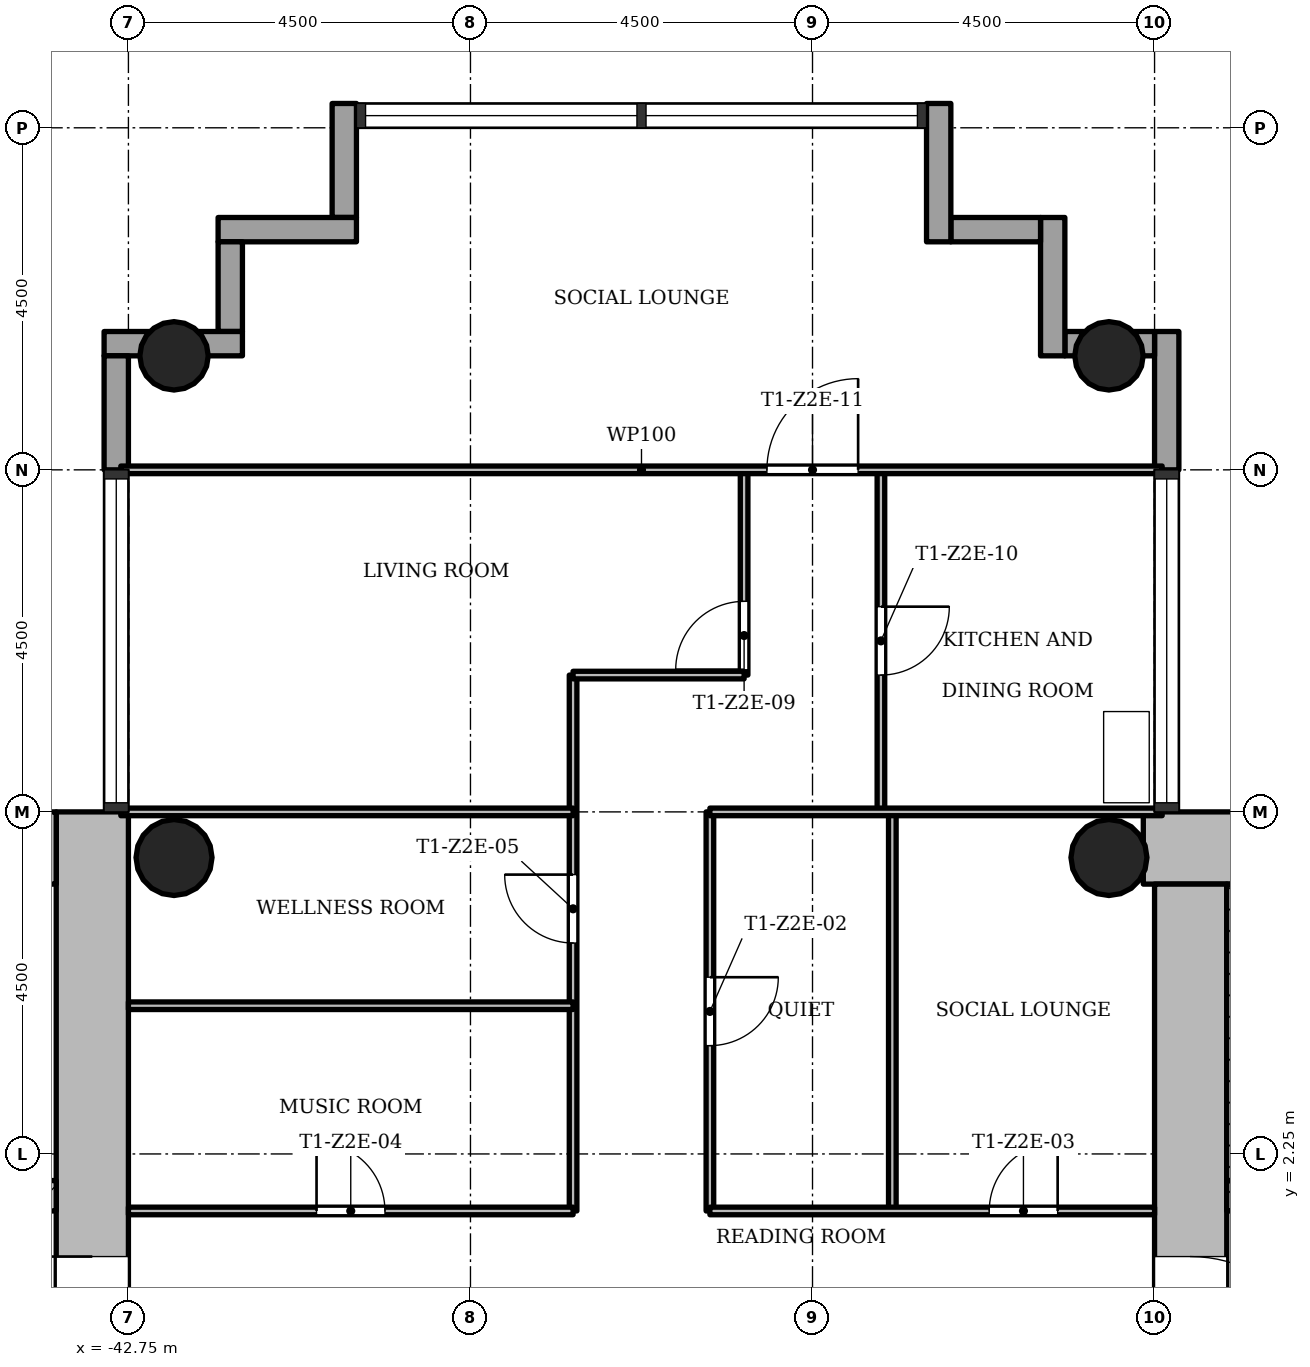
"""IFC4 building model, lengths in metres.
Left out: names, types, materials, properties, quantities, classifications, styles, units other than length and angle.
Written with IfcOpenShell. Run it as: python <this file> out.ifc"""

import sys

from ifc_helpers import new_model, si_unit, direction, frame, frame_2d, origin, origin_2d, place, context, subcontext, project, spatial, rectangle, hollow_circle, extrude, element, fill, save


model = new_model("IFC4")
c1 = context("Model", 3, precision=1e-05, world=origin(), true_north=direction((0.0, 1.0)))
c2 = subcontext(c1, "Body", "Model", "MODEL_VIEW")
j1 = project(units=[si_unit("LENGTHUNIT", "METRE"), si_unit("PLANEANGLEUNIT", "RADIAN")], contexts=[c1])
p1 = place(None, origin())
s1 = spatial("IfcSite", under=j1, at=p1, CompositionType="ELEMENT")
p2 = place(p1, origin())
s2 = spatial("IfcBuilding", under=s1, at=p2, CompositionType="ELEMENT")
p3 = place(p2, frame((0.0, 0.0, 103.8)))
s3 = spatial("IfcBuildingStorey", under=s2, at=p3, CompositionType="ELEMENT", Elevation=103.8)
p4 = place(p3, frame((-20.702, 6.275, 0.0), z_axis=(0.0, 0.0, 1.0), x_axis=(-1.0, 0.0, 0.0)))
e1 = element("IfcWall", 1, at=p4, inside=s3, PredefinedType="SHEAR", context=c2, shape_type="SweptSolid", body=[
    extrude(rectangle(XDim=8.696, YDim=0.95, at=frame_2d((4.348, 0.0))), origin(), (0.0, 0.0, 1.0), 3.4),
])
p5 = place(p3, frame((-28.775, 5.8, 0.0), z_axis=(0.0, 0.0, 1.0), x_axis=(0.0, -1.0, 0.0)))
e2 = element("IfcWall", 2, at=p5, inside=s3, PredefinedType="SHEAR", context=c2, shape_type="SweptSolid", body=[
    extrude(rectangle(XDim=12.55, YDim=0.95, at=frame_2d((6.275, 0.0))), origin(), (0.0, 0.0, 1.0), 3.4),
])
p6 = place(p5, frame((4.9, 0.0, 0.0)))
e3 = element("IfcOpeningElement", 3, at=p6, cuts=e2, PredefinedType="OPENING", context=c2, shape_type="SweptSolid", body=[
    extrude(rectangle(XDim=1.8, YDim=2.1, at=frame_2d((0.9, 1.05))), frame((0.0, 0.485, 0.0), z_axis=(0.0, -1.0, 0.0), x_axis=(1.0, 0.0, 0.0)), (0.0, 0.0, 1.0), 0.97),
])
p7 = place(p3, frame((-28.3, 1.7, 0.0), z_axis=(0.0, 0.0, 1.0), x_axis=(1.0, 0.0, 0.0)))
e4 = element("IfcWall", 4, at=p7, inside=s3, PredefinedType="SHEAR", context=c2, shape_type="SweptSolid", body=[
    extrude(rectangle(XDim=7.1, YDim=0.4, at=frame_2d((3.55, 0.0))), origin(), (0.0, 0.0, 1.0), 3.4),
])
p8 = place(p7, frame((0.7, 0.0, 0.0)))
e5 = element("IfcOpeningElement", 5, at=p8, cuts=e4, PredefinedType="OPENING", context=c2, shape_type="SweptSolid", body=[
    extrude(rectangle(XDim=0.9, YDim=2.1, at=frame_2d((0.45, 1.05))), frame((0.0, 0.21, 0.0), z_axis=(0.0, -1.0, 0.0), x_axis=(1.0, 0.0, 0.0)), (0.0, 0.0, 1.0), 0.42),
])
p9 = place(p3, frame((-43.225, -5.8, 0.0), z_axis=(0.0, 0.0, 1.0), x_axis=(0.0, 1.0, 0.0)))
e6 = element("IfcWall", 6, at=p9, inside=s3, PredefinedType="SHEAR", context=c2, shape_type="SweptSolid", body=[
    extrude(rectangle(XDim=12.55, YDim=0.95, at=frame_2d((6.275, 0.0))), origin(), (0.0, 0.0, 1.0), 3.4),
])
p10 = place(p9, frame((4.9, 0.0, 0.0)))
e7 = element("IfcOpeningElement", 7, at=p10, cuts=e6, PredefinedType="OPENING", context=c2, shape_type="SweptSolid", body=[
    extrude(rectangle(XDim=1.8, YDim=2.1, at=frame_2d((0.9, 1.05))), frame((0.0, 0.485, 0.0), z_axis=(0.0, -1.0, 0.0), x_axis=(1.0, 0.0, 0.0)), (0.0, 0.0, 1.0), 0.97),
])
p11 = place(p3, frame((-43.7, 6.275, 0.0), z_axis=(0.0, 0.0, 1.0), x_axis=(-1.0, 0.0, 0.0)))
e8 = element("IfcWall", 8, at=p11, inside=s3, PredefinedType="SHEAR", context=c2, shape_type="SweptSolid", body=[
    extrude(rectangle(XDim=8.05, YDim=0.95, at=frame_2d((4.025, 0.0))), origin(), (0.0, 0.0, 1.0), 3.4),
])
p12 = place(p3, frame((-50.8, 1.7, 0.0), z_axis=(0.0, 0.0, 1.0), x_axis=(1.0, 0.0, 0.0)))
e9 = element("IfcWall", 9, at=p12, inside=s3, PredefinedType="SHEAR", context=c2, shape_type="SweptSolid", body=[
    extrude(rectangle(XDim=7.1, YDim=0.4, at=frame_2d((3.55, 0.0))), origin(), (0.0, 0.0, 1.0), 3.4),
])
p13 = place(p12, frame((5.2, 0.0, 0.0)))
e10 = element("IfcOpeningElement", 10, at=p13, cuts=e9, PredefinedType="OPENING", context=c2, shape_type="SweptSolid", body=[
    extrude(rectangle(XDim=1.1, YDim=2.1, at=frame_2d((0.55, 1.05))), frame((0.0, 0.21, 0.0), z_axis=(0.0, -1.0, 0.0), x_axis=(1.0, 0.0, 0.0)), (0.0, 0.0, 1.0), 0.42),
])
for number, where, z_axis, x_axis in (
    (11, (-29.85, 12.75, 0.0), (0.0, 0.0, 1.0), (1.0, 0.0, 0.0)),
    (12, (-42.15, 12.75, 0.0), (0.0, 0.0, 1.0), (1.0, 0.0, 0.0)),
):
    element("IfcColumn", number, at=place(p3, frame(where, z_axis=z_axis, x_axis=x_axis)), inside=s3, PredefinedType="COLUMN", context=c2, shape_type="SweptSolid", body=[
        extrude(hollow_circle(Radius=0.45, WallThickness=0.032, at=origin_2d()), origin(), (0.0, 0.0, 1.0), 3.4),
    ])
for number, where, z_axis, x_axis in (
    (13, (-29.85, 6.15, 0.0), (0.0, 0.0, 1.0), (1.0, 0.0, 0.0)),
    (14, (-42.15, 6.15, 0.0), (0.0, 0.0, 1.0), (1.0, 0.0, 0.0)),
):
    element("IfcColumn", number, at=place(p3, frame(where, z_axis=z_axis, x_axis=x_axis)), inside=s3, PredefinedType="COLUMN", context=c2, shape_type="SweptSolid", body=[
        extrude(hollow_circle(Radius=0.5, WallThickness=0.036, at=origin_2d()), origin(), (0.0, 0.0, 1.0), 3.4),
    ])
p14 = place(p3, frame((-29.09, 11.25, -0.3), z_axis=(0.0, 0.0, 1.0), x_axis=(0.0, 1.0, 0.0)))
e15 = element("IfcWall", 15, at=p14, inside=s3, PredefinedType="STANDARD", context=c2, shape_type="SweptSolid", body=[
    extrude(rectangle(XDim=1.82, YDim=0.32, at=frame_2d((0.91, 0.0))), origin(), (0.0, 0.0, 1.0), 3.4),
])
p15 = place(p3, frame((-29.25, 12.91, -0.3), z_axis=(0.0, 0.0, 1.0), x_axis=(-1.0, 0.0, 0.0)))
e16 = element("IfcWall", 16, at=p15, inside=s3, PredefinedType="STANDARD", context=c2, shape_type="SweptSolid", body=[
    extrude(rectangle(XDim=1.18, YDim=0.32, at=frame_2d((0.59, 0.0))), origin(), (0.0, 0.0, 1.0), 3.4),
])
p16 = place(p3, frame((-30.59, 12.75, -0.3), z_axis=(0.0, 0.0, 1.0), x_axis=(0.0, 1.0, 0.0)))
e17 = element("IfcWall", 17, at=p16, inside=s3, PredefinedType="STANDARD", context=c2, shape_type="SweptSolid", body=[
    extrude(rectangle(XDim=1.82, YDim=0.32, at=frame_2d((0.91, 0.0))), origin(), (0.0, 0.0, 1.0), 3.4),
])
p17 = place(p3, frame((-30.75, 14.41, -0.3), z_axis=(0.0, 0.0, 1.0), x_axis=(-1.0, 0.0, 0.0)))
e18 = element("IfcWall", 18, at=p17, inside=s3, PredefinedType="STANDARD", context=c2, shape_type="SweptSolid", body=[
    extrude(rectangle(XDim=1.18, YDim=0.32, at=frame_2d((0.59, 0.0))), origin(), (0.0, 0.0, 1.0), 3.4),
])
p18 = place(p3, frame((-32.09, 14.25, -0.3), z_axis=(0.0, 0.0, 1.0), x_axis=(0.0, 1.0, 0.0)))
e19 = element("IfcWall", 19, at=p18, inside=s3, PredefinedType="STANDARD", context=c2, shape_type="SweptSolid", body=[
    extrude(rectangle(XDim=1.82, YDim=0.32, at=frame_2d((0.91, 0.0))), origin(), (0.0, 0.0, 1.0), 3.4),
])
p19 = place(p3, frame((-39.91, 16.07, -0.3), z_axis=(0.0, 0.0, 1.0), x_axis=(0.0, -1.0, 0.0)))
e20 = element("IfcWall", 20, at=p19, inside=s3, PredefinedType="STANDARD", context=c2, shape_type="SweptSolid", body=[
    extrude(rectangle(XDim=1.5, YDim=0.32, at=frame_2d((0.75, 0.0))), origin(), (0.0, 0.0, 1.0), 3.4),
])
p20 = place(p3, frame((-39.75, 14.41, -0.3), z_axis=(0.0, 0.0, 1.0), x_axis=(-1.0, 0.0, 0.0)))
e21 = element("IfcWall", 21, at=p20, inside=s3, PredefinedType="STANDARD", context=c2, shape_type="SweptSolid", body=[
    extrude(rectangle(XDim=1.82, YDim=0.32, at=frame_2d((0.91, 0.0))), origin(), (0.0, 0.0, 1.0), 3.4),
])
p21 = place(p3, frame((-41.41, 14.25, -0.3), z_axis=(0.0, 0.0, 1.0), x_axis=(0.0, -1.0, 0.0)))
e22 = element("IfcWall", 22, at=p21, inside=s3, PredefinedType="STANDARD", context=c2, shape_type="SweptSolid", body=[
    extrude(rectangle(XDim=1.18, YDim=0.32, at=frame_2d((0.59, 0.0))), origin(), (0.0, 0.0, 1.0), 3.4),
])
p22 = place(p3, frame((-41.25, 12.91, -0.3), z_axis=(0.0, 0.0, 1.0), x_axis=(-1.0, 0.0, 0.0)))
e23 = element("IfcWall", 23, at=p22, inside=s3, PredefinedType="STANDARD", context=c2, shape_type="SweptSolid", body=[
    extrude(rectangle(XDim=1.82, YDim=0.32, at=frame_2d((0.91, 0.0))), origin(), (0.0, 0.0, 1.0), 3.4),
])
p23 = place(p3, frame((-42.91, 12.75, -0.3), z_axis=(0.0, 0.0, 1.0), x_axis=(0.0, -1.0, 0.0)))
e24 = element("IfcWall", 24, at=p23, inside=s3, PredefinedType="STANDARD", context=c2, shape_type="SweptSolid", body=[
    extrude(rectangle(XDim=1.5, YDim=0.32, at=frame_2d((0.75, 0.0))), origin(), (0.0, 0.0, 1.0), 3.4),
])
p24 = place(p3, frame((-36.9, 1.5, 0.0), z_axis=(0.0, 0.0, 1.0), x_axis=(0.0, 1.0, 0.0)))
e25 = element("IfcWall", 25, at=p24, inside=s3, PredefinedType="PARTITIONING", context=c2, shape_type="SweptSolid", body=[
    extrude(rectangle(XDim=7.05, YDim=0.1, at=frame_2d((3.525, 0.0))), origin(), (0.0, 0.0, 1.0), 3.0),
])
p25 = place(p24, frame((3.525, 0.0, 0.0)))
e26 = element("IfcOpeningElement", 26, at=p25, cuts=e25, PredefinedType="OPENING", context=c2, shape_type="SweptSolid", body=[
    extrude(rectangle(XDim=0.9, YDim=2.1, at=frame_2d((0.45, 1.05))), frame((0.0, 0.06, 0.0), z_axis=(0.0, -1.0, 0.0), x_axis=(1.0, 0.0, 0.0)), (0.0, 0.0, 1.0), 0.12),
])
p26 = place(p3, frame((-35.1, 1.5, 0.0), z_axis=(0.0, 0.0, 1.0), x_axis=(0.0, 1.0, 0.0)))
e27 = element("IfcWall", 27, at=p26, inside=s3, PredefinedType="PARTITIONING", context=c2, shape_type="SweptSolid", body=[
    extrude(rectangle(XDim=5.25, YDim=0.1, at=frame_2d((2.625, 0.0))), origin(), (0.0, 0.0, 1.0), 3.0),
])
p27 = place(p26, frame((2.175, 0.0, 0.0)))
e28 = element("IfcOpeningElement", 28, at=p27, cuts=e27, PredefinedType="OPENING", context=c2, shape_type="SweptSolid", body=[
    extrude(rectangle(XDim=0.9, YDim=2.1, at=frame_2d((0.45, 1.05))), frame((0.0, 0.06, 0.0), z_axis=(0.0, -1.0, 0.0), x_axis=(1.0, 0.0, 0.0)), (0.0, 0.0, 1.0), 0.12),
])
p28 = place(p3, frame((-34.65, 8.55, 0.0), z_axis=(0.0, 0.0, 1.0), x_axis=(0.0, 1.0, 0.0)))
e29 = element("IfcWall", 29, at=p28, inside=s3, PredefinedType="PARTITIONING", context=c2, shape_type="SweptSolid", body=[
    extrude(rectangle(XDim=2.7, YDim=0.1, at=frame_2d((1.35, 0.0))), origin(), (0.0, 0.0, 1.0), 3.0),
])
p29 = place(p28, frame((0.07, 0.0, 0.0)))
e30 = element("IfcOpeningElement", 30, at=p29, cuts=e29, PredefinedType="OPENING", context=c2, shape_type="SweptSolid", body=[
    extrude(rectangle(XDim=0.9, YDim=2.1, at=frame_2d((0.45, 1.05))), frame((0.0, 0.06, 0.0), z_axis=(0.0, -1.0, 0.0), x_axis=(1.0, 0.0, 0.0)), (0.0, 0.0, 1.0), 0.12),
])
p30 = place(p3, frame((-32.85, 6.75, 0.0), z_axis=(0.0, 0.0, 1.0), x_axis=(0.0, 1.0, 0.0)))
e31 = element("IfcWall", 31, at=p30, inside=s3, PredefinedType="PARTITIONING", context=c2, shape_type="SweptSolid", body=[
    extrude(rectangle(XDim=4.5, YDim=0.1, at=frame_2d((2.25, 0.0))), origin(), (0.0, 0.0, 1.0), 3.0),
])
p31 = place(p30, frame((1.8, 0.0, 0.0)))
e32 = element("IfcOpeningElement", 32, at=p31, cuts=e31, PredefinedType="OPENING", context=c2, shape_type="SweptSolid", body=[
    extrude(rectangle(XDim=0.9, YDim=2.1, at=frame_2d((0.45, 1.05))), frame((0.0, 0.06, 0.0), z_axis=(0.0, -1.0, 0.0), x_axis=(1.0, 0.0, 0.0)), (0.0, 0.0, 1.0), 0.12),
])
p32 = place(p3, frame((-32.7, 1.5, 0.0), z_axis=(0.0, 0.0, 1.0), x_axis=(0.0, 1.0, 0.0)))
e33 = element("IfcWall", 33, at=p32, inside=s3, PredefinedType="PARTITIONING", context=c2, shape_type="SweptSolid", body=[
    extrude(rectangle(XDim=5.25, YDim=0.1, at=frame_2d((2.625, 0.0))), origin(), (0.0, 0.0, 1.0), 3.0),
])
p33 = place(p3, frame((-42.75, 1.5, 0.0), z_axis=(0.0, 0.0, 1.0), x_axis=(1.0, 0.0, 0.0)))
e34 = element("IfcWall", 34, at=p33, inside=s3, PredefinedType="PARTITIONING", context=c2, shape_type="SweptSolid", body=[
    extrude(rectangle(XDim=5.85, YDim=0.1, at=frame_2d((2.925, 0.0))), origin(), (0.0, 0.0, 1.0), 3.0),
])
p34 = place(p33, frame((2.475, 0.0, 0.0)))
e35 = element("IfcOpeningElement", 35, at=p34, cuts=e34, PredefinedType="OPENING", context=c2, shape_type="SweptSolid", body=[
    extrude(rectangle(XDim=0.9, YDim=2.1, at=frame_2d((0.45, 1.05))), frame((0.0, 0.06, 0.0), z_axis=(0.0, -1.0, 0.0), x_axis=(1.0, 0.0, 0.0)), (0.0, 0.0, 1.0), 0.12),
])
p35 = place(p3, frame((-35.1, 1.5, 0.0), z_axis=(0.0, 0.0, 1.0), x_axis=(1.0, 0.0, 0.0)))
e36 = element("IfcWall", 36, at=p35, inside=s3, PredefinedType="PARTITIONING", context=c2, shape_type="SweptSolid", body=[
    extrude(rectangle(XDim=5.85, YDim=0.1, at=frame_2d((2.925, 0.0))), origin(), (0.0, 0.0, 1.0), 3.0),
])
p36 = place(p35, frame((3.675, 0.0, 0.0)))
e37 = element("IfcOpeningElement", 37, at=p36, cuts=e36, PredefinedType="OPENING", context=c2, shape_type="SweptSolid", body=[
    extrude(rectangle(XDim=0.9, YDim=2.1, at=frame_2d((0.45, 1.05))), frame((0.0, 0.06, 0.0), z_axis=(0.0, -1.0, 0.0), x_axis=(1.0, 0.0, 0.0)), (0.0, 0.0, 1.0), 0.12),
])
p37 = place(p3, frame((-42.75, 4.2, 0.0), z_axis=(0.0, 0.0, 1.0), x_axis=(1.0, 0.0, 0.0)))
e38 = element("IfcWall", 38, at=p37, inside=s3, PredefinedType="PARTITIONING", context=c2, shape_type="SweptSolid", body=[
    extrude(rectangle(XDim=5.85, YDim=0.1, at=frame_2d((2.925, 0.0))), origin(), (0.0, 0.0, 1.0), 3.0),
])
for number, where, z_axis, x_axis in (
    (39, (-42.85, 6.75, 0.0), (0.0, 0.0, 1.0), (1.0, 0.0, 0.0)),
    (40, (-35.1, 6.75, 0.0), (0.0, 0.0, 1.0), (1.0, 0.0, 0.0)),
):
    element("IfcWall", number, at=place(p3, frame(where, z_axis=z_axis, x_axis=x_axis)), inside=s3, PredefinedType="PARTITIONING", context=c2, shape_type="SweptSolid", body=[
        extrude(rectangle(XDim=5.95, YDim=0.1, at=frame_2d((2.975, 0.0))), origin(), (0.0, 0.0, 1.0), 3.0),
    ])
p38 = place(p3, frame((-36.9, 8.55, 0.0), z_axis=(0.0, 0.0, 1.0), x_axis=(1.0, 0.0, 0.0)))
e41 = element("IfcWall", 41, at=p38, inside=s3, PredefinedType="PARTITIONING", context=c2, shape_type="SweptSolid", body=[
    extrude(rectangle(XDim=2.25, YDim=0.1, at=frame_2d((1.125, 0.0))), origin(), (0.0, 0.0, 1.0), 3.0),
])
p39 = place(p3, frame((-42.85, 11.25, 0.0), z_axis=(0.0, 0.0, 1.0), x_axis=(1.0, 0.0, 0.0)))
e42 = element("IfcWall", 42, at=p39, inside=s3, PredefinedType="PARTITIONING", context=c2, shape_type="SweptSolid", body=[
    extrude(rectangle(XDim=13.7, YDim=0.1, at=frame_2d((6.85, 0.0))), origin(), (0.0, 0.0, 1.0), 3.0),
])
p40 = place(p39, frame((8.5, 0.0, 0.0)))
e43 = element("IfcOpeningElement", 43, at=p40, cuts=e42, PredefinedType="OPENING", context=c2, shape_type="SweptSolid", body=[
    extrude(rectangle(XDim=1.2, YDim=2.1, at=frame_2d((0.6, 1.05))), frame((0.0, 0.06, 0.0), z_axis=(0.0, -1.0, 0.0), x_axis=(1.0, 0.0, 0.0)), (0.0, 0.0, 1.0), 0.12),
])
p41 = place(p3, frame((-28.175, 1.9, 0.0), z_axis=(0.0, 0.0, 1.0), x_axis=(0.0, 1.0, 0.0)))
e44 = element("IfcWall", 44, at=p41, inside=s3, PredefinedType="SHEAR", context=c2, shape_type="SweptSolid", body=[
    extrude(rectangle(XDim=3.9, YDim=0.25, at=frame_2d((1.95, 0.0))), origin(), (0.0, 0.0, 1.0), 3.4),
])
p42 = place(p27, origin())
e45 = element("IfcDoor", 45, at=p42, inside=s3, OperationType="SINGLE_SWING_RIGHT", PredefinedType="DOOR", context=c2, shape_type="SweptSolid", body=[
    extrude(rectangle(XDim=0.9, YDim=2.1, at=frame_2d((0.45, 1.05))), frame((0.0, 0.025, 0.0), z_axis=(0.0, -1.0, 0.0), x_axis=(1.0, 0.0, 0.0)), (0.0, 0.0, 1.0), 0.05),
])
fill(e28, e45)
p43 = place(p36, origin())
e46 = element("IfcDoor", 46, at=p43, inside=s3, OperationType="SINGLE_SWING_LEFT", PredefinedType="DOOR", context=c2, shape_type="SweptSolid", body=[
    extrude(rectangle(XDim=0.9, YDim=2.1, at=frame_2d((0.45, 1.05))), frame((0.0, 0.025, 0.0), z_axis=(0.0, -1.0, 0.0), x_axis=(1.0, 0.0, 0.0)), (0.0, 0.0, 1.0), 0.05),
])
fill(e37, e46)
p44 = place(p34, origin())
e47 = element("IfcDoor", 47, at=p44, inside=s3, OperationType="SINGLE_SWING_RIGHT", PredefinedType="DOOR", context=c2, shape_type="SweptSolid", body=[
    extrude(rectangle(XDim=0.9, YDim=2.1, at=frame_2d((0.45, 1.05))), frame((0.0, 0.025, 0.0), z_axis=(0.0, -1.0, 0.0), x_axis=(1.0, 0.0, 0.0)), (0.0, 0.0, 1.0), 0.05),
])
fill(e35, e47)
p45 = place(p25, origin())
e48 = element("IfcDoor", 48, at=p45, inside=s3, OperationType="SINGLE_SWING_LEFT", PredefinedType="DOOR", context=c2, shape_type="SweptSolid", body=[
    extrude(rectangle(XDim=0.9, YDim=2.1, at=frame_2d((0.45, 1.05))), frame((0.0, 0.025, 0.0), z_axis=(0.0, -1.0, 0.0), x_axis=(1.0, 0.0, 0.0)), (0.0, 0.0, 1.0), 0.05),
])
fill(e26, e48)
p46 = place(p29, origin())
e49 = element("IfcDoor", 49, at=p46, inside=s3, OperationType="SINGLE_SWING_RIGHT", PredefinedType="DOOR", context=c2, shape_type="SweptSolid", body=[
    extrude(rectangle(XDim=0.9, YDim=2.1, at=frame_2d((0.45, 1.05))), frame((0.0, 0.025, 0.0), z_axis=(0.0, -1.0, 0.0), x_axis=(1.0, 0.0, 0.0)), (0.0, 0.0, 1.0), 0.05),
])
fill(e30, e49)
p47 = place(p31, origin())
e50 = element("IfcDoor", 50, at=p47, inside=s3, OperationType="SINGLE_SWING_RIGHT", PredefinedType="DOOR", context=c2, shape_type="SweptSolid", body=[
    extrude(rectangle(XDim=0.9, YDim=2.1, at=frame_2d((0.45, 1.05))), frame((0.0, 0.025, 0.0), z_axis=(0.0, -1.0, 0.0), x_axis=(1.0, 0.0, 0.0)), (0.0, 0.0, 1.0), 0.05),
])
fill(e32, e50)
p48 = place(p40, origin())
e51 = element("IfcDoor", 51, at=p48, inside=s3, OperationType="SINGLE_SWING_LEFT", PredefinedType="DOOR", context=c2, shape_type="SweptSolid", body=[
    extrude(rectangle(XDim=1.2, YDim=2.1, at=frame_2d((0.6, 1.05))), frame((0.0, 0.025, 0.0), z_axis=(0.0, -1.0, 0.0), x_axis=(1.0, 0.0, 0.0)), (0.0, 0.0, 1.0), 0.05),
])
fill(e43, e51)
p49 = place(p6, origin())
e52 = element("IfcDoor", 52, at=p49, inside=s3, OperationType="SINGLE_SWING_LEFT", PredefinedType="DOOR", context=c2, shape_type="SweptSolid", body=[
    extrude(rectangle(XDim=1.8, YDim=2.1, at=frame_2d((0.9, 1.05))), frame((0.0, 0.025, 0.0), z_axis=(0.0, -1.0, 0.0), x_axis=(1.0, 0.0, 0.0)), (0.0, 0.0, 1.0), 0.05),
])
fill(e3, e52)
p50 = place(p10, origin())
e53 = element("IfcDoor", 53, at=p50, inside=s3, OperationType="SINGLE_SWING_LEFT", PredefinedType="DOOR", context=c2, shape_type="SweptSolid", body=[
    extrude(rectangle(XDim=1.8, YDim=2.1, at=frame_2d((0.9, 1.05))), frame((0.0, 0.025, 0.0), z_axis=(0.0, -1.0, 0.0), x_axis=(1.0, 0.0, 0.0)), (0.0, 0.0, 1.0), 0.05),
])
fill(e7, e53)
save(model, sys.argv[1])
